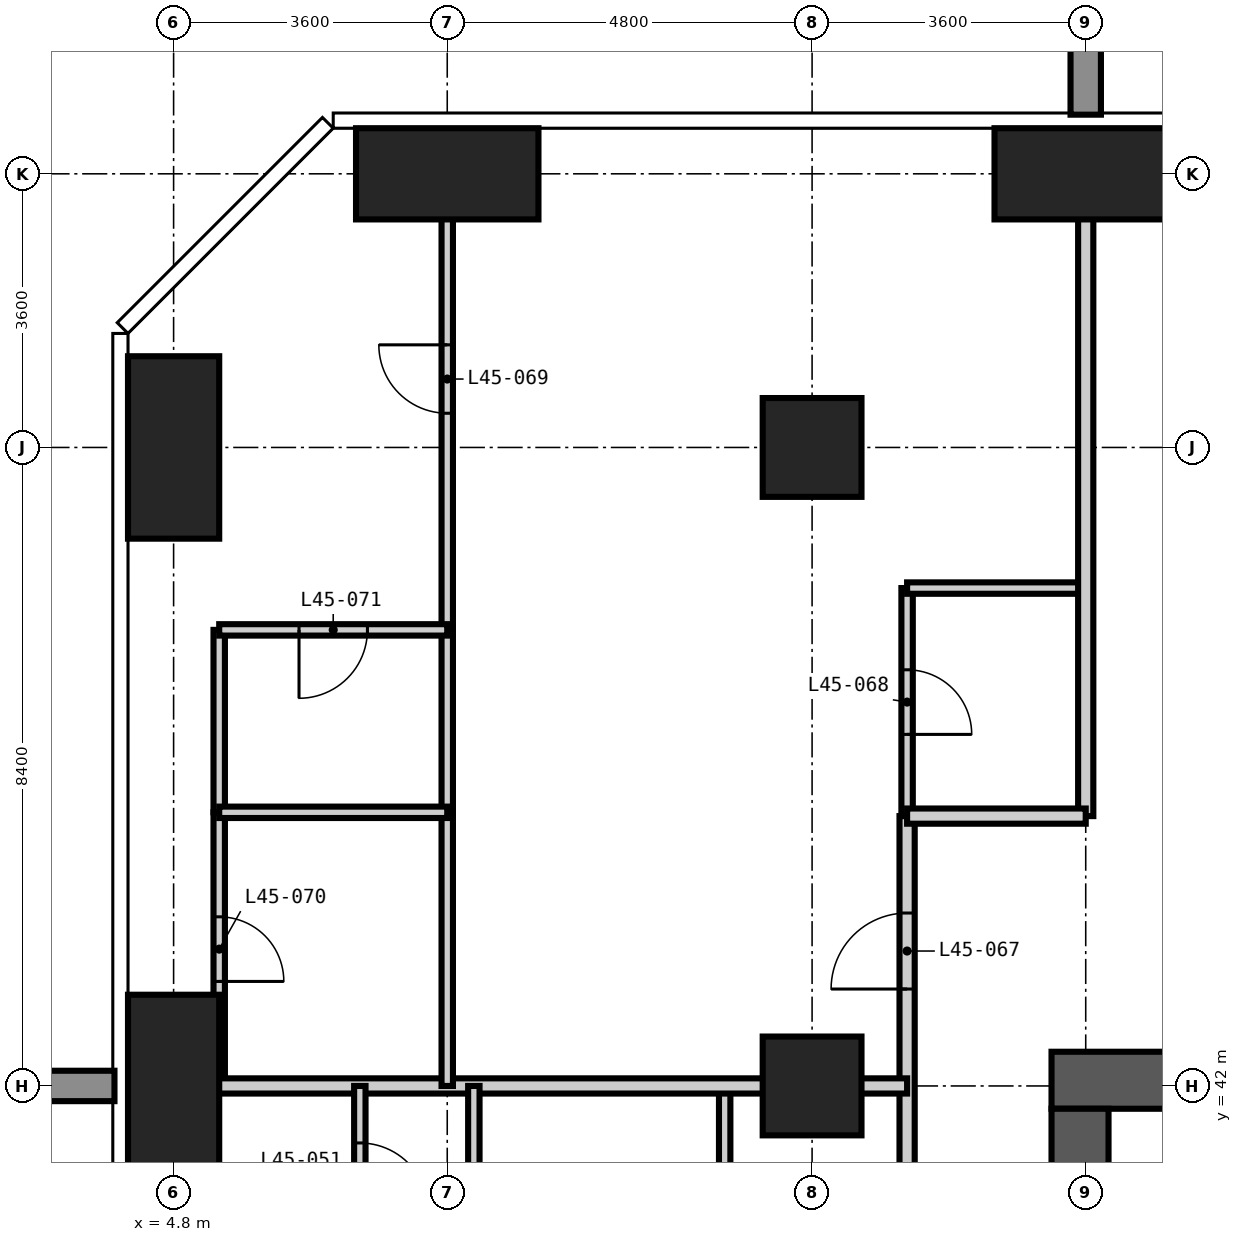
"""IFC4 building model, lengths in metres.
Left out: names, types, materials, properties, quantities, classifications, styles, units other than length and angle.
Written with IfcOpenShell. Run it as: python <this file> out.ifc"""

import sys

from ifc_helpers import new_model, si_unit, direction, frame, frame_2d, origin, origin_2d, place, context, subcontext, project, spatial, rectangle, extrude, element, fill, save


model = new_model("IFC4")
c1 = context("Model", 3, precision=1e-05, world=origin(), true_north=direction((0.0, 1.0)))
c2 = subcontext(c1, "Body", "Model", "MODEL_VIEW")
j1 = project(units=[si_unit("LENGTHUNIT", "METRE"), si_unit("PLANEANGLEUNIT", "RADIAN")], contexts=[c1])
p1 = place(None, origin())
s1 = spatial("IfcSite", under=j1, at=p1, CompositionType="ELEMENT")
p2 = place(p1, origin())
s2 = spatial("IfcBuilding", under=s1, at=p2, CompositionType="ELEMENT")
p3 = place(p2, frame((0.0, 0.0, 177.0)))
s3 = spatial("IfcBuildingStorey", under=s2, at=p3, CompositionType="ELEMENT", Elevation=177.0)
for number, where, z_axis, x_axis in (
    (1, (4.8, 42.0, -0.35), (0.0, 0.0, 1.0), (1.0, 0.0, 0.0)),
    (2, (4.8, 50.4, -0.35), (0.0, 0.0, 1.0), (1.0, 0.0, 0.0)),
):
    element("IfcColumn", number, at=place(p3, frame(where, z_axis=z_axis, x_axis=x_axis)), inside=s3, PredefinedType="COLUMN", context=c2, shape_type="SweptSolid", body=[
        extrude(rectangle(XDim=1.2, YDim=2.4, at=origin_2d()), origin(), (0.0, 0.0, 1.0), 3.6),
    ])
p4 = place(p3, frame((8.4, 54.0, -0.35), z_axis=(0.0, 0.0, 1.0), x_axis=(1.0, 0.0, 0.0)))
e3 = element("IfcColumn", 3, at=p4, inside=s3, PredefinedType="COLUMN", context=c2, shape_type="SweptSolid", body=[
    extrude(rectangle(XDim=2.4, YDim=1.2, at=origin_2d()), origin(), (0.0, 0.0, 1.0), 3.6),
])
for number, where, z_axis, x_axis in (
    (4, (13.2, 42.0, -0.35), (0.0, 0.0, 1.0), (1.0, 0.0, 0.0)),
    (5, (13.2, 50.4, -0.35), (0.0, 0.0, 1.0), (1.0, 0.0, 0.0)),
):
    element("IfcColumn", number, at=place(p3, frame(where, z_axis=z_axis, x_axis=x_axis)), inside=s3, PredefinedType="COLUMN", context=c2, shape_type="SweptSolid", body=[
        extrude(rectangle(XDim=1.3, YDim=1.3, at=origin_2d()), origin(), (0.0, 0.0, 1.0), 3.6),
    ])
p5 = place(p3, frame((16.8, 54.0, -0.35), z_axis=(0.0, 0.0, 1.0), x_axis=(1.0, 0.0, 0.0)))
e6 = element("IfcColumn", 6, at=p5, inside=s3, PredefinedType="COLUMN", context=c2, shape_type="SweptSolid", body=[
    extrude(rectangle(XDim=2.4, YDim=1.2, at=origin_2d()), origin(), (0.0, 0.0, 1.0), 3.6),
])
p6 = place(p3, frame((42.45, 42.075, -0.35), z_axis=(0.0, 0.0, 1.0), x_axis=(-1.0, 0.0, 0.0)))
e7 = element("IfcWall", 7, at=p6, inside=s3, PredefinedType="SHEAR", context=c2, shape_type="SweptSolid", body=[
    extrude(rectangle(XDim=26.1, YDim=0.75, at=frame_2d((13.05, 0.0))), origin(), (0.0, 0.0, 1.0), 3.6),
])
p7 = place(p6, frame((20.95, 0.0, 0.35)))
e8 = element("IfcOpeningElement", 8, at=p7, cuts=e7, PredefinedType="OPENING", context=c2, shape_type="SweptSolid", body=[
    extrude(rectangle(XDim=1.0, YDim=2.1, at=frame_2d((0.5, 1.05))), frame((0.0, 0.385, 0.0), z_axis=(0.0, -1.0, 0.0), x_axis=(1.0, 0.0, 0.0)), (0.0, 0.0, 1.0), 0.77),
])
p8 = place(p6, frame((10.35, 0.0, 0.35)))
e9 = element("IfcOpeningElement", 9, at=p8, cuts=e7, PredefinedType="OPENING", context=c2, shape_type="SweptSolid", body=[
    extrude(rectangle(XDim=1.2, YDim=2.2, at=frame_2d((0.6, 1.1))), frame((0.0, 0.385, 0.0), z_axis=(0.0, -1.0, 0.0), x_axis=(1.0, 0.0, 0.0)), (0.0, 0.0, 1.0), 0.77),
])
p9 = place(p3, frame((16.725, 41.7, -0.35), z_axis=(0.0, 0.0, 1.0), x_axis=(0.0, -1.0, 0.0)))
e10 = element("IfcWall", 10, at=p9, inside=s3, PredefinedType="SHEAR", context=c2, shape_type="SweptSolid", body=[
    extrude(rectangle(XDim=24.6, YDim=0.75, at=frame_2d((12.3, 0.0))), origin(), (0.0, 0.0, 1.0), 3.6),
])
p10 = place(p9, frame((11.4, 0.0, 0.35)))
e11 = element("IfcOpeningElement", 11, at=p10, cuts=e10, PredefinedType="OPENING", context=c2, shape_type="SweptSolid", body=[
    extrude(rectangle(XDim=1.8, YDim=2.2, at=frame_2d((0.9, 1.1))), frame((0.0, 0.385, 0.0), z_axis=(0.0, -1.0, 0.0), x_axis=(1.0, 0.0, 0.0)), (0.0, 0.0, 1.0), 0.77),
])
p11 = place(p9, frame((20.2, 0.0, 0.35)))
e12 = element("IfcOpeningElement", 12, at=p11, cuts=e10, PredefinedType="OPENING", context=c2, shape_type="SweptSolid", body=[
    extrude(rectangle(XDim=1.0, YDim=2.1, at=frame_2d((0.5, 1.05))), frame((0.0, 0.385, 0.0), z_axis=(0.0, -1.0, 0.0), x_axis=(1.0, 0.0, 0.0)), (0.0, 0.0, 1.0), 0.77),
])
p12 = place(p9, frame((5.5, 0.0, 0.35)))
e13 = element("IfcOpeningElement", 13, at=p12, cuts=e10, PredefinedType="OPENING", context=c2, shape_type="SweptSolid", body=[
    extrude(rectangle(XDim=1.0, YDim=2.1, at=frame_2d((0.5, 1.05))), frame((0.0, 0.385, 0.0), z_axis=(0.0, -1.0, 0.0), x_axis=(1.0, 0.0, 0.0)), (0.0, 0.0, 1.0), 0.77),
])
p13 = place(p3, frame((5.4, 42.0, 0.0), z_axis=(0.0, 0.0, 1.0), x_axis=(0.0, 1.0, 0.0)))
e14 = element("IfcWall", 14, at=p13, inside=s3, PredefinedType="PARTITIONING", context=c2, shape_type="SweptSolid", body=[
    extrude(rectangle(XDim=3.6, YDim=0.15, at=frame_2d((1.8, 0.0))), origin(), (0.0, 0.0, 1.0), 3.25),
])
p14 = place(p13, frame((1.375, 0.0, 0.0)))
e15 = element("IfcOpeningElement", 15, at=p14, cuts=e14, PredefinedType="OPENING", context=c2, shape_type="SweptSolid", body=[
    extrude(rectangle(XDim=0.85, YDim=2.1, at=frame_2d((0.425, 1.05))), frame((0.0, 0.085, 0.0), z_axis=(0.0, -1.0, 0.0), x_axis=(1.0, 0.0, 0.0)), (0.0, 0.0, 1.0), 0.17),
])
p15 = place(p3, frame((12.05, 39.6, 0.0), z_axis=(0.0, 0.0, 1.0), x_axis=(0.0, 1.0, 0.0)))
e16 = element("IfcWall", 16, at=p15, inside=s3, PredefinedType="PARTITIONING", context=c2, shape_type="SweptSolid", body=[
    extrude(rectangle(XDim=2.4, YDim=0.15, at=frame_2d((1.2, 0.0))), origin(), (0.0, 0.0, 1.0), 3.25),
])
p16 = place(p3, frame((14.45, 45.55, 0.0), z_axis=(0.0, 0.0, 1.0), x_axis=(0.0, 1.0, 0.0)))
e17 = element("IfcWall", 17, at=p16, inside=s3, PredefinedType="PARTITIONING", context=c2, shape_type="SweptSolid", body=[
    extrude(rectangle(XDim=3.0, YDim=0.15, at=frame_2d((1.5, 0.0))), origin(), (0.0, 0.0, 1.0), 3.25),
])
p17 = place(p16, frame((1.075, 0.0, 0.0)))
e18 = element("IfcOpeningElement", 18, at=p17, cuts=e17, PredefinedType="OPENING", context=c2, shape_type="SweptSolid", body=[
    extrude(rectangle(XDim=0.85, YDim=2.1, at=frame_2d((0.425, 1.05))), frame((0.0, 0.085, 0.0), z_axis=(0.0, -1.0, 0.0), x_axis=(1.0, 0.0, 0.0)), (0.0, 0.0, 1.0), 0.17),
])
p18 = place(p3, frame((14.45, 48.55, 0.0), z_axis=(0.0, 0.0, 1.0), x_axis=(1.0, 0.0, 0.0)))
e19 = element("IfcWall", 19, at=p18, inside=s3, PredefinedType="PARTITIONING", context=c2, shape_type="SweptSolid", body=[
    extrude(rectangle(XDim=2.35, YDim=0.15, at=frame_2d((1.175, 0.0))), origin(), (0.0, 0.0, 1.0), 3.25),
])
p19 = place(p3, frame((14.45, 14.45, 0.0), z_axis=(0.0, 0.0, 1.0), x_axis=(0.0, 1.0, 0.0)))
e20 = element("IfcWall", 20, at=p19, inside=s3, PredefinedType="PARTITIONING", context=c2, shape_type="SweptSolid", body=[
    extrude(rectangle(XDim=31.1, YDim=0.2, at=frame_2d((15.55, 0.0))), origin(), (0.0, 0.0, 1.0), 3.25),
])
p20 = place(p19, frame((6.05, 0.0, 0.0)))
e21 = element("IfcOpeningElement", 21, at=p20, cuts=e20, PredefinedType="OPENING", context=c2, shape_type="SweptSolid", body=[
    extrude(rectangle(XDim=1.0, YDim=2.2, at=frame_2d((0.5, 1.1))), frame((0.0, 0.11, 0.0), z_axis=(0.0, -1.0, 0.0), x_axis=(1.0, 0.0, 0.0)), (0.0, 0.0, 1.0), 0.22),
])
p21 = place(p19, frame((11.95, 0.0, 0.0)))
e22 = element("IfcOpeningElement", 22, at=p21, cuts=e20, PredefinedType="OPENING", context=c2, shape_type="SweptSolid", body=[
    extrude(rectangle(XDim=1.8, YDim=2.4, at=frame_2d((0.9, 1.2))), frame((0.0, 0.11, 0.0), z_axis=(0.0, -1.0, 0.0), x_axis=(1.0, 0.0, 0.0)), (0.0, 0.0, 1.0), 0.22),
])
p22 = place(p19, frame((19.575, 0.0, 0.0)))
e23 = element("IfcOpeningElement", 23, at=p22, cuts=e20, PredefinedType="OPENING", context=c2, shape_type="SweptSolid", body=[
    extrude(rectangle(XDim=1.0, YDim=2.2, at=frame_2d((0.5, 1.1))), frame((0.0, 0.11, 0.0), z_axis=(0.0, -1.0, 0.0), x_axis=(1.0, 0.0, 0.0)), (0.0, 0.0, 1.0), 0.22),
])
p23 = place(p19, frame((24.95, 0.0, 0.0)))
e24 = element("IfcOpeningElement", 24, at=p23, cuts=e20, PredefinedType="OPENING", context=c2, shape_type="SweptSolid", body=[
    extrude(rectangle(XDim=1.0, YDim=2.2, at=frame_2d((0.5, 1.1))), frame((0.0, 0.11, 0.0), z_axis=(0.0, -1.0, 0.0), x_axis=(1.0, 0.0, 0.0)), (0.0, 0.0, 1.0), 0.22),
])
p24 = place(p19, frame((0.675, 0.0, 0.0)))
e25 = element("IfcOpeningElement", 25, at=p24, cuts=e20, PredefinedType="OPENING", context=c2, shape_type="SweptSolid", body=[
    extrude(rectangle(XDim=1.0, YDim=2.2, at=frame_2d((0.5, 1.1))), frame((0.0, 0.11, 0.0), z_axis=(0.0, -1.0, 0.0), x_axis=(1.0, 0.0, 0.0)), (0.0, 0.0, 1.0), 0.22),
])
p25 = place(p19, frame((28.825, 0.0, 0.0)))
e26 = element("IfcOpeningElement", 26, at=p25, cuts=e20, PredefinedType="OPENING", context=c2, shape_type="SweptSolid", body=[
    extrude(rectangle(XDim=1.0, YDim=2.2, at=frame_2d((0.5, 1.1))), frame((0.0, 0.11, 0.0), z_axis=(0.0, -1.0, 0.0), x_axis=(1.0, 0.0, 0.0)), (0.0, 0.0, 1.0), 0.22),
])
p26 = place(p3, frame((16.8, 45.55, 0.0), z_axis=(0.0, 0.0, 1.0), x_axis=(0.0, 1.0, 0.0)))
e27 = element("IfcWall", 27, at=p26, inside=s3, PredefinedType="PARTITIONING", context=c2, shape_type="SweptSolid", body=[
    extrude(rectangle(XDim=9.068, YDim=0.2, at=frame_2d((4.534, 0.0))), origin(), (0.0, 0.0, 1.0), 3.25),
])
p27 = place(p3, frame((14.45, 45.55, 0.0), z_axis=(0.0, 0.0, 1.0), x_axis=(1.0, 0.0, 0.0)))
e28 = element("IfcWall", 28, at=p27, inside=s3, PredefinedType="PARTITIONING", context=c2, shape_type="SweptSolid", body=[
    extrude(rectangle(XDim=2.35, YDim=0.2, at=frame_2d((1.175, 0.0))), origin(), (0.0, 0.0, 1.0), 3.25),
])
p28 = place(p3, frame((4.182, 42.0, 0.0), z_axis=(0.0, 0.0, 1.0), x_axis=(1.0, 0.0, 0.0)))
e29 = element("IfcWall", 29, at=p28, inside=s3, PredefinedType="PARTITIONING", context=c2, shape_type="SweptSolid", body=[
    extrude(rectangle(XDim=10.268, YDim=0.2, at=frame_2d((5.134, 0.0))), origin(), (0.0, 0.0, 1.0), 3.25),
])
p29 = place(p3, frame((5.4, 45.6, 0.0), z_axis=(0.0, 0.0, 1.0), x_axis=(0.0, 1.0, 0.0)))
e30 = element("IfcWall", 30, at=p29, inside=s3, PredefinedType="PARTITIONING", context=c2, shape_type="SweptSolid", body=[
    extrude(rectangle(XDim=2.4, YDim=0.15, at=frame_2d((1.2, 0.0))), origin(), (0.0, 0.0, 1.0), 3.25),
])
p30 = place(p3, frame((7.25, 39.6, 0.0), z_axis=(0.0, 0.0, 1.0), x_axis=(0.0, 1.0, 0.0)))
e31 = element("IfcWall", 31, at=p30, inside=s3, PredefinedType="PARTITIONING", context=c2, shape_type="SweptSolid", body=[
    extrude(rectangle(XDim=2.4, YDim=0.15, at=frame_2d((1.2, 0.0))), origin(), (0.0, 0.0, 1.0), 3.25),
])
p31 = place(p30, frame((0.75, 0.0, 0.0)))
e32 = element("IfcOpeningElement", 32, at=p31, cuts=e31, PredefinedType="OPENING", context=c2, shape_type="SweptSolid", body=[
    extrude(rectangle(XDim=0.9, YDim=2.1, at=frame_2d((0.45, 1.05))), frame((0.0, 0.085, 0.0), z_axis=(0.0, -1.0, 0.0), x_axis=(1.0, 0.0, 0.0)), (0.0, 0.0, 1.0), 0.17),
])
p32 = place(p3, frame((8.4, 42.0, 0.0), z_axis=(0.0, 0.0, 1.0), x_axis=(0.0, 1.0, 0.0)))
e33 = element("IfcWall", 33, at=p32, inside=s3, PredefinedType="PARTITIONING", context=c2, shape_type="SweptSolid", body=[
    extrude(rectangle(XDim=12.618, YDim=0.15, at=frame_2d((6.309, 0.0))), origin(), (0.0, 0.0, 1.0), 3.25),
])
p33 = place(p32, frame((8.85, 0.0, 0.0)))
e34 = element("IfcOpeningElement", 34, at=p33, cuts=e33, PredefinedType="OPENING", context=c2, shape_type="SweptSolid", body=[
    extrude(rectangle(XDim=0.9, YDim=2.1, at=frame_2d((0.45, 1.05))), frame((0.0, 0.085, 0.0), z_axis=(0.0, -1.0, 0.0), x_axis=(1.0, 0.0, 0.0)), (0.0, 0.0, 1.0), 0.17),
])
p34 = place(p3, frame((8.75, 39.6, 0.0), z_axis=(0.0, 0.0, 1.0), x_axis=(0.0, 1.0, 0.0)))
e35 = element("IfcWall", 35, at=p34, inside=s3, PredefinedType="PARTITIONING", context=c2, shape_type="SweptSolid", body=[
    extrude(rectangle(XDim=2.4, YDim=0.15, at=frame_2d((1.2, 0.0))), origin(), (0.0, 0.0, 1.0), 3.25),
])
p35 = place(p3, frame((5.4, 45.6, 0.0), z_axis=(0.0, 0.0, 1.0), x_axis=(1.0, 0.0, 0.0)))
e36 = element("IfcWall", 36, at=p35, inside=s3, PredefinedType="PARTITIONING", context=c2, shape_type="SweptSolid", body=[
    extrude(rectangle(XDim=3.0, YDim=0.15, at=frame_2d((1.5, 0.0))), origin(), (0.0, 0.0, 1.0), 3.25),
])
p36 = place(p3, frame((5.4, 48.0, 0.0), z_axis=(0.0, 0.0, 1.0), x_axis=(1.0, 0.0, 0.0)))
e37 = element("IfcWall", 37, at=p36, inside=s3, PredefinedType="PARTITIONING", context=c2, shape_type="SweptSolid", body=[
    extrude(rectangle(XDim=3.0, YDim=0.15, at=frame_2d((1.5, 0.0))), origin(), (0.0, 0.0, 1.0), 3.25),
])
p37 = place(p36, frame((1.05, 0.0, 0.0)))
e38 = element("IfcOpeningElement", 38, at=p37, cuts=e37, PredefinedType="OPENING", context=c2, shape_type="SweptSolid", body=[
    extrude(rectangle(XDim=0.9, YDim=2.1, at=frame_2d((0.45, 1.05))), frame((0.0, 0.085, 0.0), z_axis=(0.0, -1.0, 0.0), x_axis=(1.0, 0.0, 0.0)), (0.0, 0.0, 1.0), 0.17),
])
p38 = place(p31, frame((0.9, 0.0, 0.0), z_axis=(0.0, 0.0, 1.0), x_axis=(-1.0, 0.0, 0.0)))
e39 = element("IfcDoor", 39, at=p38, inside=s3, OperationType="SINGLE_SWING_RIGHT", PredefinedType="DOOR", context=c2, shape_type="SweptSolid", body=[
    extrude(rectangle(XDim=0.9, YDim=2.1, at=frame_2d((0.45, 1.05))), frame((0.0, 0.025, 0.0), z_axis=(0.0, -1.0, 0.0), x_axis=(1.0, 0.0, 0.0)), (0.0, 0.0, 1.0), 0.05),
])
fill(e32, e39)
p39 = place(p25, origin())
e40 = element("IfcDoor", 40, at=p39, inside=s3, OperationType="SINGLE_SWING_LEFT", PredefinedType="DOOR", context=c2, shape_type="SweptSolid", body=[
    extrude(rectangle(XDim=1.0, YDim=2.2, at=frame_2d((0.5, 1.1))), frame((0.0, 0.025, 0.0), z_axis=(0.0, -1.0, 0.0), x_axis=(1.0, 0.0, 0.0)), (0.0, 0.0, 1.0), 0.05),
])
fill(e26, e40)
p40 = place(p17, frame((0.85, 0.0, 0.0), z_axis=(0.0, 0.0, 1.0), x_axis=(-1.0, 0.0, 0.0)))
e41 = element("IfcDoor", 41, at=p40, inside=s3, OperationType="SINGLE_SWING_RIGHT", PredefinedType="DOOR", context=c2, shape_type="SweptSolid", body=[
    extrude(rectangle(XDim=0.85, YDim=2.1, at=frame_2d((0.425, 1.05))), frame((0.0, 0.025, 0.0), z_axis=(0.0, -1.0, 0.0), x_axis=(1.0, 0.0, 0.0)), (0.0, 0.0, 1.0), 0.05),
])
fill(e18, e41)
p41 = place(p33, origin())
e42 = element("IfcDoor", 42, at=p41, inside=s3, OperationType="SINGLE_SWING_RIGHT", PredefinedType="DOOR", context=c2, shape_type="SweptSolid", body=[
    extrude(rectangle(XDim=0.9, YDim=2.1, at=frame_2d((0.45, 1.05))), frame((0.0, 0.025, 0.0), z_axis=(0.0, -1.0, 0.0), x_axis=(1.0, 0.0, 0.0)), (0.0, 0.0, 1.0), 0.05),
])
fill(e34, e42)
p42 = place(p14, frame((0.85, 0.0, 0.0), z_axis=(0.0, 0.0, 1.0), x_axis=(-1.0, 0.0, 0.0)))
e43 = element("IfcDoor", 43, at=p42, inside=s3, OperationType="SINGLE_SWING_RIGHT", PredefinedType="DOOR", context=c2, shape_type="SweptSolid", body=[
    extrude(rectangle(XDim=0.85, YDim=2.1, at=frame_2d((0.425, 1.05))), frame((0.0, 0.025, 0.0), z_axis=(0.0, -1.0, 0.0), x_axis=(1.0, 0.0, 0.0)), (0.0, 0.0, 1.0), 0.05),
])
fill(e15, e43)
p43 = place(p37, frame((0.9, 0.0, 0.0), z_axis=(0.0, 0.0, 1.0), x_axis=(-1.0, 0.0, 0.0)))
e44 = element("IfcDoor", 44, at=p43, inside=s3, OperationType="SINGLE_SWING_RIGHT", PredefinedType="DOOR", context=c2, shape_type="SweptSolid", body=[
    extrude(rectangle(XDim=0.9, YDim=2.1, at=frame_2d((0.45, 1.05))), frame((0.0, 0.025, 0.0), z_axis=(0.0, -1.0, 0.0), x_axis=(1.0, 0.0, 0.0)), (0.0, 0.0, 1.0), 0.05),
])
fill(e38, e44)
save(model, sys.argv[1])
